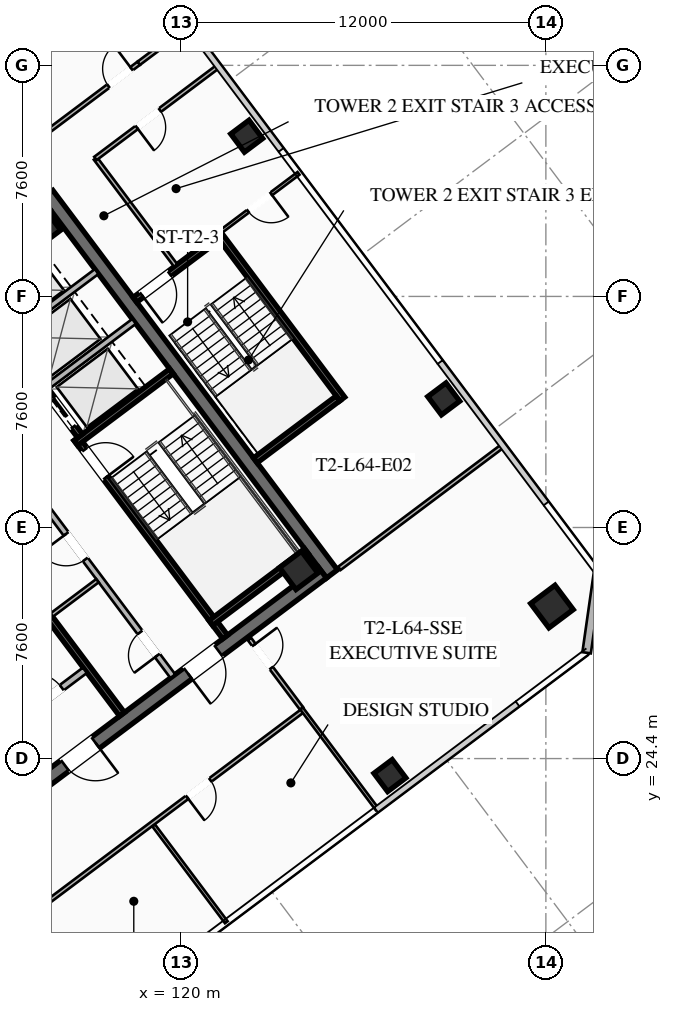
"""IFC4 building model, lengths in metres.
Left out: names, types, materials, properties, quantities, classifications, styles, units other than length and angle.
Written with IfcOpenShell. Run it as: python <this file> out.ifc"""

import sys

from ifc_helpers import new_model, si_unit, direction, frame, frame_2d, origin, origin_2d, place, context, subcontext, project, spatial, rectangle, hollow_rectangle, extrude, element, fill, save


model = new_model("IFC4")
c1 = context("Model", 3, precision=1e-05, world=origin(), true_north=direction((0.0, 1.0)))
c2 = subcontext(c1, "Body", "Model", "MODEL_VIEW")
j1 = project(units=[si_unit("LENGTHUNIT", "METRE"), si_unit("PLANEANGLEUNIT", "RADIAN")], contexts=[c1])
p1 = place(None, origin())
s1 = spatial("IfcSite", under=j1, at=p1, CompositionType="ELEMENT")
p2 = place(p1, origin())
s2 = spatial("IfcBuilding", under=s1, at=p2, CompositionType="ELEMENT")
p3 = place(p2, frame((0.0, 0.0, 236.15)))
s3 = spatial("IfcBuildingStorey", under=s2, at=p3, CompositionType="ELEMENT", Elevation=236.15)
p4 = place(p3, frame((115.604, 42.953, 0.0), z_axis=(0.0, 0.0, 1.0), x_axis=(0.600005007985, -0.799996243986, 0.0)))
e1 = element("IfcWall", 1, at=p4, inside=s3, PredefinedType="SHEAR", context=c2, shape_type="SweptSolid", body=[
    extrude(rectangle(XDim=15.6, YDim=0.45, at=frame_2d((7.8, 0.0))), origin(), (0.0, 0.0, 1.0), 3.55),
])
p5 = place(p3, frame((124.649, 30.518, 0.0), z_axis=(0.0, 0.0, 1.0), x_axis=(-0.8, -0.6, 0.0)))
e2 = element("IfcWall", 2, at=p5, inside=s3, PredefinedType="SHEAR", context=c2, shape_type="SweptSolid", body=[
    extrude(rectangle(XDim=15.26, YDim=0.45, at=frame_2d((7.63, 0.0))), origin(), (0.0, 0.0, 1.0), 3.55),
])
p6 = place(p5, frame((9.33, 0.0, 0.0)))
e3 = element("IfcOpeningElement", 3, at=p6, cuts=e2, PredefinedType="OPENING", context=c2, shape_type="SweptSolid", body=[
    extrude(rectangle(XDim=1.25, YDim=2.25, at=frame_2d((0.625, 1.125))), frame((0.0, 0.235, 0.0), z_axis=(0.0, -1.0, 0.0), x_axis=(1.0, 0.0, 0.0)), (0.0, 0.0, 1.0), 0.47),
])
p7 = place(p5, frame((4.28, 0.0, 0.0)))
e4 = element("IfcOpeningElement", 4, at=p7, cuts=e2, PredefinedType="OPENING", context=c2, shape_type="SweptSolid", body=[
    extrude(rectangle(XDim=1.25, YDim=2.25, at=frame_2d((0.625, 1.125))), frame((0.0, 0.235, 0.0), z_axis=(0.0, -1.0, 0.0), x_axis=(1.0, 0.0, 0.0)), (0.0, 0.0, 1.0), 0.47),
])
for number, where, z_axis, x_axis in (
    (5, (123.87, 30.59, 0.0), (0.0, 0.0, 1.0), (0.8, 0.6, 0.0)),
    (6, (115.41, 41.87, 0.0), (0.0, 0.0, 1.0), (0.8, 0.6, 0.0)),
):
    element("IfcColumn", number, at=place(p3, frame(where, z_axis=z_axis, x_axis=x_axis)), inside=s3, PredefinedType="COLUMN", context=c2, shape_type="SweptSolid", body=[
        extrude(hollow_rectangle(XDim=0.9, YDim=0.9, WallThickness=0.04, at=origin_2d()), origin(), (0.0, 0.0, 1.0), 3.37),
    ])
p8 = place(p3, frame((132.2, 29.4, 0.0), z_axis=(0.0, 0.0, 1.0), x_axis=(0.799999996291, 0.600000004945, 0.0)))
e7 = element("IfcColumn", 7, at=p8, inside=s3, PredefinedType="COLUMN", context=c2, shape_type="SweptSolid", body=[
    extrude(hollow_rectangle(XDim=1.0, YDim=1.0, WallThickness=0.04, at=origin_2d()), origin(), (0.0, 0.0, 1.0), 3.37),
])
for number, where, z_axis, x_axis in (
    (8, (126.87, 23.84, 0.0), (0.0, 0.0, 1.0), (0.8, 0.6, 0.0)),
    (9, (128.64, 36.23, 0.0), (0.0, 0.0, 1.0), (0.8, 0.6, 0.0)),
    (10, (122.16, 44.87, 0.0), (0.0, 0.0, 1.0), (0.8, 0.6, 0.0)),
):
    element("IfcColumn", number, at=place(p3, frame(where, z_axis=z_axis, x_axis=x_axis)), inside=s3, PredefinedType="COLUMN", context=c2, shape_type="SweptSolid", body=[
        extrude(hollow_rectangle(XDim=0.75, YDim=0.75, WallThickness=0.032, at=origin_2d()), origin(), (0.0, 0.0, 1.0), 3.37),
    ])
p9 = place(p3, frame((133.72, 30.54, 0.0), z_axis=(0.0, 0.0, 1.0), x_axis=(-0.141370477216, -0.989956760759, 0.0)))
e11 = element("IfcWall", 11, at=p9, inside=s3, PredefinedType="SOLIDWALL", context=c2, shape_type="SweptSolid", body=[
    extrude(rectangle(XDim=2.687, YDim=0.28, at=frame_2d((1.344, 0.0))), origin(), (0.0, 0.0, 1.0), 3.37),
])
p10 = place(p3, frame((116.56, 34.92, 0.0), z_axis=(0.0, 0.0, 1.0), x_axis=(0.59999041401, -0.800007189403, 0.0)))
e12 = element("IfcWall", 12, at=p10, inside=s3, PredefinedType="SHEAR", context=c2, shape_type="SweptSolid", body=[
    extrude(rectangle(XDim=8.15, YDim=0.2, at=frame_2d((4.075, 0.0))), origin(), (0.0, 0.0, 1.0), 3.37),
])
p11 = place(p10, frame((0.45, 0.0, 0.0)))
e13 = element("IfcOpeningElement", 13, at=p11, cuts=e12, PredefinedType="OPENING", context=c2, shape_type="SweptSolid", body=[
    extrude(rectangle(XDim=1.15, YDim=2.2, at=frame_2d((0.575, 1.1))), frame((0.0, 0.11, 0.0), z_axis=(0.0, -1.0, 0.0), x_axis=(1.0, 0.0, 0.0)), (0.0, 0.0, 1.0), 0.22),
])
for number, where, z_axis, x_axis in (
    (14, (116.54, 34.78, 0.0), (0.0, 0.0, 1.0), (0.8, 0.6, 0.0)),
    (15, (120.98, 28.86, 0.0), (0.0, 0.0, 1.0), (0.8, 0.6, 0.0)),
):
    element("IfcWall", number, at=place(p3, frame(where, z_axis=z_axis, x_axis=x_axis)), inside=s3, PredefinedType="SHEAR", context=c2, shape_type="SweptSolid", body=[
        extrude(rectangle(XDim=3.93, YDim=0.2, at=frame_2d((1.965, 0.0))), origin(), (0.0, 0.0, 1.0), 3.37),
    ])
p12 = place(p3, frame((118.058, 25.856, 0.0), z_axis=(0.0, 0.0, 1.0), x_axis=(-0.600002657301, 0.799998007018, 0.0)))
e16 = element("IfcWall", 16, at=p12, inside=s3, PredefinedType="SHEAR", context=c2, shape_type="SweptSolid", body=[
    extrude(rectangle(XDim=14.7, YDim=0.2, at=frame_2d((7.35, 0.0))), origin(), (0.0, 0.0, 1.0), 3.37),
])
p13 = place(p3, frame((114.316, 25.412, 0.0), z_axis=(0.0, 0.0, 1.0), x_axis=(0.800018601094, 0.59997519774, 0.0)))
e17 = element("IfcWall", 17, at=p13, inside=s3, PredefinedType="SOLIDWALL", context=c2, shape_type="SweptSolid", body=[
    extrude(rectangle(XDim=3.15, YDim=0.22, at=frame_2d((1.575, 0.0))), origin(), (0.0, 0.0, 1.0), 2.723),
])
p14 = place(p13, frame((0.95, 0.0, 0.0)))
e18 = element("IfcOpeningElement", 18, at=p14, cuts=e17, PredefinedType="OPENING", context=c2, shape_type="SweptSolid", body=[
    extrude(rectangle(XDim=1.25, YDim=2.25, at=frame_2d((0.625, 1.125))), frame((0.0, 0.12, 0.0), z_axis=(0.0, -1.0, 0.0), x_axis=(1.0, 0.0, 0.0)), (0.0, 0.0, 1.0), 0.24),
])
p15 = place(p3, frame((112.75, 40.25, 0.0), z_axis=(0.0, 0.0, 1.0), x_axis=(0.599994036198, -0.800004472816, 0.0)))
e19 = element("IfcWall", 19, at=p15, inside=s3, PredefinedType="SHEAR", context=c2, shape_type="SweptSolid", body=[
    extrude(rectangle(XDim=6.55, YDim=0.2, at=frame_2d((3.275, 0.0))), origin(), (0.0, 0.0, 1.0), 3.37),
])
p16 = place(p15, frame((5.075, 0.0, 0.0)))
e20 = element("IfcOpeningElement", 20, at=p16, cuts=e19, PredefinedType="OPENING", context=c2, shape_type="SweptSolid", body=[
    extrude(rectangle(XDim=1.1, YDim=2.2, at=frame_2d((0.55, 1.1))), frame((0.0, 0.11, 0.0), z_axis=(0.0, -1.0, 0.0), x_axis=(1.0, 0.0, 0.0)), (0.0, 0.0, 1.0), 0.22),
])
p17 = place(p15, frame((3.025, 0.0, 0.0)))
e21 = element("IfcOpeningElement", 21, at=p17, cuts=e19, PredefinedType="OPENING", context=c2, shape_type="SweptSolid", body=[
    extrude(rectangle(XDim=1.1, YDim=2.2, at=frame_2d((0.55, 1.1))), frame((0.0, 0.11, 0.0), z_axis=(0.0, -1.0, 0.0), x_axis=(1.0, 0.0, 0.0)), (0.0, 0.0, 1.0), 0.22),
])
p18 = place(p15, frame((1.025, 0.0, 0.0)))
e22 = element("IfcOpeningElement", 22, at=p18, cuts=e19, PredefinedType="OPENING", context=c2, shape_type="SweptSolid", body=[
    extrude(rectangle(XDim=1.1, YDim=2.2, at=frame_2d((0.55, 1.1))), frame((0.0, 0.11, 0.0), z_axis=(0.0, -1.0, 0.0), x_axis=(1.0, 0.0, 0.0)), (0.0, 0.0, 1.0), 0.22),
])
for number, where, z_axis, x_axis in (
    (23, (115.59, 36.63, 0.0), (0.0, 0.0, 1.0), (0.8, 0.6, 0.0)),
    (24, (114.36, 38.27, 0.0), (0.0, 0.0, 1.0), (0.8, 0.6, 0.0)),
):
    element("IfcWall", number, at=place(p3, frame(where, z_axis=z_axis, x_axis=x_axis)), inside=s3, PredefinedType="SOLIDWALL", context=c2, shape_type="SweptSolid", body=[
        extrude(rectangle(XDim=3.58, YDim=0.2, at=frame_2d((1.79, 0.0))), origin(), (0.0, 0.0, 1.0), 3.37),
    ])
p19 = place(p3, frame((119.73, 27.11, 0.0), z_axis=(0.0, 0.0, 1.0), x_axis=(-0.600005580459, 0.799995814625, 0.0)))
e25 = element("IfcWall", 25, at=p19, inside=s3, PredefinedType="SOLIDWALL", context=c2, shape_type="SweptSolid", body=[
    extrude(rectangle(XDim=7.0, YDim=0.2, at=frame_2d((3.5, 0.0))), origin(), (0.0, 0.0, 1.0), 2.723),
])
p20 = place(p19, frame((0.85, 0.0, 0.0)))
e26 = element("IfcOpeningElement", 26, at=p20, cuts=e25, PredefinedType="OPENING", context=c2, shape_type="SweptSolid", body=[
    extrude(rectangle(XDim=0.95, YDim=2.05, at=frame_2d((0.475, 1.025))), frame((0.0, 0.11, 0.0), z_axis=(0.0, -1.0, 0.0), x_axis=(1.0, 0.0, 0.0)), (0.0, 0.0, 1.0), 0.22),
])
p21 = place(p19, frame((4.8, 0.0, 0.0)))
e27 = element("IfcOpeningElement", 27, at=p21, cuts=e25, PredefinedType="OPENING", context=c2, shape_type="SweptSolid", body=[
    extrude(rectangle(XDim=1.05, YDim=2.2, at=frame_2d((0.525, 1.1))), frame((0.0, 0.11, 0.0), z_axis=(0.0, -1.0, 0.0), x_axis=(1.0, 0.0, 0.0)), (0.0, 0.0, 1.0), 0.22),
])
p22 = place(p3, frame((115.746, 29.122, 0.0), z_axis=(0.0, 0.0, 1.0), x_axis=(0.8, 0.6, 0.0)))
e28 = element("IfcWall", 28, at=p22, inside=s3, PredefinedType="PARTITIONING", context=c2, shape_type="SweptSolid", body=[
    extrude(rectangle(XDim=1.88, YDim=0.135, at=frame_2d((0.94, 0.0))), origin(), (0.0, 0.0, 1.0), 2.723),
])
p23 = place(p3, frame((125.304, 36.228, 0.0), z_axis=(0.0, 0.0, 1.0), x_axis=(-0.59998851072, 0.800008616831, 0.0)))
e29 = element("IfcWall", 29, at=p23, inside=s3, PredefinedType="SHEAR", context=c2, shape_type="SweptSolid", body=[
    extrude(rectangle(XDim=6.8, YDim=0.2, at=frame_2d((3.4, 0.0))), origin(), (0.0, 0.0, 1.0), 3.37),
])
p24 = place(p3, frame((121.204, 41.528, 0.0), z_axis=(0.0, 0.0, 1.0), x_axis=(-0.800017232136, -0.599977023131, 0.0)))
e30 = element("IfcWall", 30, at=p24, inside=s3, PredefinedType="SHEAR", context=c2, shape_type="SweptSolid", body=[
    extrude(rectangle(XDim=3.4, YDim=0.2, at=frame_2d((1.7, 0.0))), origin(), (0.0, 0.0, 1.0), 3.37),
])
p25 = place(p24, frame((1.975, 0.0, 0.0)))
e31 = element("IfcOpeningElement", 31, at=p25, cuts=e30, PredefinedType="OPENING", context=c2, shape_type="SweptSolid", body=[
    extrude(rectangle(XDim=1.15, YDim=2.2, at=frame_2d((0.575, 1.1))), frame((0.0, 0.11, 0.0), z_axis=(0.0, -1.0, 0.0), x_axis=(1.0, 0.0, 0.0)), (0.0, 0.0, 1.0), 0.22),
])
p26 = place(p3, frame((122.444, 34.208, 0.0), z_axis=(0.0, 0.0, 1.0), x_axis=(0.79999138319, 0.600011488909, 0.0)))
e32 = element("IfcWall", 32, at=p26, inside=s3, PredefinedType="SHEAR", context=c2, shape_type="SweptSolid", body=[
    extrude(rectangle(XDim=3.4, YDim=0.2, at=frame_2d((1.7, 0.0))), origin(), (0.0, 0.0, 1.0), 3.37),
])
p27 = place(p3, frame((119.824, 40.618, 0.0), z_axis=(0.0, 0.0, 1.0), x_axis=(-0.599982243973, 0.800013316712, 0.0)))
e33 = element("IfcWall", 33, at=p27, inside=s3, PredefinedType="PARTITIONING", context=c2, shape_type="SweptSolid", body=[
    extrude(rectangle(XDim=4.4, YDim=0.135, at=frame_2d((2.2, 0.0))), origin(), (0.0, 0.0, 1.0), 2.723),
])
p28 = place(p3, frame((99.746, 33.122, 0.0), z_axis=(0.0, 0.0, 1.0), x_axis=(0.800001242445, 0.599998343403, 0.0)))
e34 = element("IfcWall", 34, at=p28, inside=s3, PredefinedType="PARTITIONING", context=c2, shape_type="SweptSolid", body=[
    extrude(rectangle(XDim=23.58, YDim=0.135, at=frame_2d((11.79, 0.0))), origin(), (0.0, 0.0, 1.0), 2.723),
])
p29 = place(p28, frame((0.3, 0.0, 0.0)))
e35 = element("IfcOpeningElement", 35, at=p29, cuts=e34, PredefinedType="OPENING", context=c2, shape_type="SweptSolid", body=[
    extrude(rectangle(XDim=0.95, YDim=2.05, at=frame_2d((0.475, 1.025))), frame((0.0, 0.077, 0.0), z_axis=(0.0, -1.0, 0.0), x_axis=(1.0, 0.0, 0.0)), (0.0, 0.0, 1.0), 0.155),
])
p30 = place(p28, frame((10.512, 0.0, 0.0)))
e36 = element("IfcOpeningElement", 36, at=p30, cuts=e34, PredefinedType="OPENING", context=c2, shape_type="SweptSolid", body=[
    extrude(rectangle(XDim=0.95, YDim=2.05, at=frame_2d((0.475, 1.025))), frame((0.0, 0.077, 0.0), z_axis=(0.0, -1.0, 0.0), x_axis=(1.0, 0.0, 0.0)), (0.0, 0.0, 1.0), 0.155),
])
p31 = place(p28, frame((22.33, 0.0, 0.0)))
e37 = element("IfcOpeningElement", 37, at=p31, cuts=e34, PredefinedType="OPENING", context=c2, shape_type="SweptSolid", body=[
    extrude(rectangle(XDim=0.95, YDim=2.05, at=frame_2d((0.475, 1.025))), frame((0.0, 0.077, 0.0), z_axis=(0.0, -1.0, 0.0), x_axis=(1.0, 0.0, 0.0)), (0.0, 0.0, 1.0), 0.155),
])
p32 = place(p3, frame((118.61, 47.27, 0.0), z_axis=(0.0, 0.0, 1.0), x_axis=(0.799956698502, 0.600057730991, 0.0)))
e38 = element("IfcWall", 38, at=p32, inside=s3, PredefinedType="PARTITIONING", context=c2, shape_type="SweptSolid", body=[
    extrude(rectangle(XDim=2.03, YDim=0.135, at=frame_2d((1.015, 0.0))), origin(), (0.0, 0.0, 1.0), 2.723),
])
p33 = place(p3, frame((124.012, 25.984, 0.0), z_axis=(0.0, 0.0, 1.0), x_axis=(-0.800003872688, -0.599994836382, 0.0)))
e39 = element("IfcWall", 39, at=p33, inside=s3, PredefinedType="PARTITIONING", context=c2, shape_type="SweptSolid", body=[
    extrude(rectangle(XDim=15.13, YDim=0.135, at=frame_2d((7.565, 0.0))), origin(), (0.0, 0.0, 1.0), 2.723),
])
p34 = place(p33, frame((13.8, 0.0, 0.0)))
e40 = element("IfcOpeningElement", 40, at=p34, cuts=e39, PredefinedType="OPENING", context=c2, shape_type="SweptSolid", body=[
    extrude(rectangle(XDim=0.95, YDim=2.05, at=frame_2d((0.475, 1.025))), frame((0.0, 0.077, 0.0), z_axis=(0.0, -1.0, 0.0), x_axis=(1.0, 0.0, 0.0)), (0.0, 0.0, 1.0), 0.155),
])
p35 = place(p33, frame((3.813, 0.0, 0.0)))
e41 = element("IfcOpeningElement", 41, at=p35, cuts=e39, PredefinedType="OPENING", context=c2, shape_type="SweptSolid", body=[
    extrude(rectangle(XDim=0.95, YDim=2.05, at=frame_2d((0.475, 1.025))), frame((0.0, 0.077, 0.0), z_axis=(0.0, -1.0, 0.0), x_axis=(1.0, 0.0, 0.0)), (0.0, 0.0, 1.0), 0.155),
])
p36 = place(p3, frame((122.248, 28.336, 0.0), z_axis=(0.0, 0.0, 1.0), x_axis=(0.600040975122, -0.799969267018, 0.0)))
e42 = element("IfcWall", 42, at=p36, inside=s3, PredefinedType="PARTITIONING", context=c2, shape_type="SweptSolid", body=[
    extrude(rectangle(XDim=2.86, YDim=0.135, at=frame_2d((1.43, 0.0))), origin(), (0.0, 0.0, 1.0), 2.723),
])
p37 = place(p36, frame((0.25, 0.0, 0.0)))
e43 = element("IfcOpeningElement", 43, at=p37, cuts=e42, PredefinedType="OPENING", context=c2, shape_type="SweptSolid", body=[
    extrude(rectangle(XDim=0.95, YDim=2.05, at=frame_2d((0.475, 1.025))), frame((0.0, 0.077, 0.0), z_axis=(0.0, -1.0, 0.0), x_axis=(1.0, 0.0, 0.0)), (0.0, 0.0, 1.0), 0.155),
])
p38 = place(p3, frame((121.488, 19.016, 0.0), z_axis=(0.0, 0.0, 1.0), x_axis=(-0.600009815063, 0.799992638609, 0.0)))
e44 = element("IfcWall", 44, at=p38, inside=s3, PredefinedType="PARTITIONING", context=c2, shape_type="SweptSolid", body=[
    extrude(rectangle(XDim=3.98, YDim=0.11, at=frame_2d((1.99, 0.0))), origin(), (0.0, 0.0, 1.0), 2.723),
])
p39 = place(p3, frame((126.448, 22.736, 0.0), z_axis=(0.0, 0.0, 1.0), x_axis=(-0.599981128793, 0.800014153057, 0.0)))
e45 = element("IfcWall", 45, at=p39, inside=s3, PredefinedType="PARTITIONING", context=c2, shape_type="SweptSolid", body=[
    extrude(rectangle(XDim=4.14, YDim=0.11, at=frame_2d((2.07, 0.0))), origin(), (0.0, 0.0, 1.0), 2.723),
])
p40 = place(p3, frame((121.224, 47.168, 0.0), z_axis=(0.0, 0.0, 1.0), x_axis=(-0.8, -0.6, 0.0)))
e46 = element("IfcWall", 46, at=p40, inside=s3, PredefinedType="PARTITIONING", context=c2, shape_type="SweptSolid", body=[
    extrude(rectangle(XDim=5.05, YDim=0.135, at=frame_2d((2.525, 0.0))), origin(), (0.0, 0.0, 1.0), 2.723),
])
p41 = place(p40, frame((2.4, 0.0, 0.0)))
e47 = element("IfcOpeningElement", 47, at=p41, cuts=e46, PredefinedType="OPENING", context=c2, shape_type="SweptSolid", body=[
    extrude(rectangle(XDim=0.95, YDim=2.05, at=frame_2d((0.475, 1.025))), frame((0.0, 0.077, 0.0), z_axis=(0.0, -1.0, 0.0), x_axis=(1.0, 0.0, 0.0)), (0.0, 0.0, 1.0), 0.155),
])
p42 = place(p3, frame((125.208, 30.656, 0.0), z_axis=(0.0, 0.0, 1.0), x_axis=(0.8, 0.6, 0.0)))
e48 = element("IfcWall", 48, at=p42, inside=s3, PredefinedType="PARTITIONING", context=c2, shape_type="SweptSolid", body=[
    extrude(rectangle(XDim=6.72, YDim=0.135, at=frame_2d((3.36, 0.0))), origin(), (0.0, 0.0, 1.0), 2.723),
])
p43 = place(p3, frame((123.864, 43.648, 0.0), z_axis=(0.0, 0.0, 1.0), x_axis=(-0.800018310174, -0.599975585658, 0.0)))
e49 = element("IfcWall", 49, at=p43, inside=s3, PredefinedType="PARTITIONING", context=c2, shape_type="SweptSolid", body=[
    extrude(rectangle(XDim=3.2, YDim=0.11, at=frame_2d((1.6, 0.0))), origin(), (0.0, 0.0, 1.0), 2.723),
])
p44 = place(p43, frame((1.125, 0.0, 0.0)))
e50 = element("IfcOpeningElement", 50, at=p44, cuts=e49, PredefinedType="OPENING", context=c2, shape_type="SweptSolid", body=[
    extrude(rectangle(XDim=0.95, YDim=2.05, at=frame_2d((0.475, 1.025))), frame((0.0, 0.065, 0.0), z_axis=(0.0, -1.0, 0.0), x_axis=(1.0, 0.0, 0.0)), (0.0, 0.0, 1.0), 0.13),
])
p45 = place(p6, origin())
e51 = element("IfcDoor", 51, at=p45, inside=s3, OperationType="SINGLE_SWING_LEFT", PredefinedType="DOOR", context=c2, shape_type="SweptSolid", body=[
    extrude(rectangle(XDim=1.25, YDim=2.25, at=frame_2d((0.625, 1.125))), frame((0.0, 0.025, 0.0), z_axis=(0.0, -1.0, 0.0), x_axis=(1.0, 0.0, 0.0)), (0.0, 0.0, 1.0), 0.05),
])
fill(e3, e51)
p46 = place(p7, origin())
e52 = element("IfcDoor", 52, at=p46, inside=s3, OperationType="SINGLE_SWING_RIGHT", PredefinedType="DOOR", context=c2, shape_type="SweptSolid", body=[
    extrude(rectangle(XDim=1.25, YDim=2.25, at=frame_2d((0.625, 1.125))), frame((0.0, 0.025, 0.0), z_axis=(0.0, -1.0, 0.0), x_axis=(1.0, 0.0, 0.0)), (0.0, 0.0, 1.0), 0.05),
])
fill(e4, e52)
p47 = place(p11, origin())
e53 = element("IfcDoor", 53, at=p47, inside=s3, OperationType="SINGLE_SWING_RIGHT", PredefinedType="DOOR", context=c2, shape_type="SweptSolid", body=[
    extrude(rectangle(XDim=1.15, YDim=2.2, at=frame_2d((0.575, 1.1))), frame((0.0, 0.025, 0.0), z_axis=(0.0, -1.0, 0.0), x_axis=(1.0, 0.0, 0.0)), (0.0, 0.0, 1.0), 0.05),
])
fill(e13, e53)
p48 = place(p14, origin())
e54 = element("IfcDoor", 54, at=p48, inside=s3, OperationType="SINGLE_SWING_LEFT", PredefinedType="DOOR", context=c2, shape_type="SweptSolid", body=[
    extrude(rectangle(XDim=1.25, YDim=2.25, at=frame_2d((0.625, 1.125))), frame((0.0, 0.025, 0.0), z_axis=(0.0, -1.0, 0.0), x_axis=(1.0, 0.0, 0.0)), (0.0, 0.0, 1.0), 0.05),
])
fill(e18, e54)
p49 = place(p20, origin())
e55 = element("IfcDoor", 55, at=p49, inside=s3, OperationType="SINGLE_SWING_LEFT", PredefinedType="DOOR", context=c2, shape_type="SweptSolid", body=[
    extrude(rectangle(XDim=0.95, YDim=2.05, at=frame_2d((0.475, 1.025))), frame((0.0, 0.025, 0.0), z_axis=(0.0, -1.0, 0.0), x_axis=(1.0, 0.0, 0.0)), (0.0, 0.0, 1.0), 0.05),
])
fill(e26, e55)
p50 = place(p21, origin())
e56 = element("IfcDoor", 56, at=p50, inside=s3, OperationType="SINGLE_SWING_RIGHT", PredefinedType="DOOR", context=c2, shape_type="SweptSolid", body=[
    extrude(rectangle(XDim=1.05, YDim=2.2, at=frame_2d((0.525, 1.1))), frame((0.0, 0.025, 0.0), z_axis=(0.0, -1.0, 0.0), x_axis=(1.0, 0.0, 0.0)), (0.0, 0.0, 1.0), 0.05),
])
fill(e27, e56)
p51 = place(p25, origin())
e57 = element("IfcDoor", 57, at=p51, inside=s3, OperationType="SINGLE_SWING_RIGHT", PredefinedType="DOOR", context=c2, shape_type="SweptSolid", body=[
    extrude(rectangle(XDim=1.15, YDim=2.2, at=frame_2d((0.575, 1.1))), frame((0.0, 0.025, 0.0), z_axis=(0.0, -1.0, 0.0), x_axis=(1.0, 0.0, 0.0)), (0.0, 0.0, 1.0), 0.05),
])
fill(e31, e57)
p52 = place(p31, origin())
e58 = element("IfcDoor", 58, at=p52, inside=s3, OperationType="SINGLE_SWING_RIGHT", PredefinedType="DOOR", context=c2, shape_type="SweptSolid", body=[
    extrude(rectangle(XDim=0.95, YDim=2.05, at=frame_2d((0.475, 1.025))), frame((0.0, 0.025, 0.0), z_axis=(0.0, -1.0, 0.0), x_axis=(1.0, 0.0, 0.0)), (0.0, 0.0, 1.0), 0.05),
])
fill(e37, e58)
p53 = place(p35, origin())
e59 = element("IfcDoor", 59, at=p53, inside=s3, OperationType="SINGLE_SWING_RIGHT", PredefinedType="DOOR", context=c2, shape_type="SweptSolid", body=[
    extrude(rectangle(XDim=0.95, YDim=2.05, at=frame_2d((0.475, 1.025))), frame((0.0, 0.025, 0.0), z_axis=(0.0, -1.0, 0.0), x_axis=(1.0, 0.0, 0.0)), (0.0, 0.0, 1.0), 0.05),
])
fill(e41, e59)
p54 = place(p37, origin())
e60 = element("IfcDoor", 60, at=p54, inside=s3, OperationType="SINGLE_SWING_LEFT", PredefinedType="DOOR", context=c2, shape_type="SweptSolid", body=[
    extrude(rectangle(XDim=0.95, YDim=2.05, at=frame_2d((0.475, 1.025))), frame((0.0, 0.025, 0.0), z_axis=(0.0, -1.0, 0.0), x_axis=(1.0, 0.0, 0.0)), (0.0, 0.0, 1.0), 0.05),
])
fill(e43, e60)
p55 = place(p41, origin())
e61 = element("IfcDoor", 61, at=p55, inside=s3, OperationType="SINGLE_SWING_RIGHT", PredefinedType="DOOR", context=c2, shape_type="SweptSolid", body=[
    extrude(rectangle(XDim=0.95, YDim=2.05, at=frame_2d((0.475, 1.025))), frame((0.0, 0.025, 0.0), z_axis=(0.0, -1.0, 0.0), x_axis=(1.0, 0.0, 0.0)), (0.0, 0.0, 1.0), 0.05),
])
fill(e47, e61)
p56 = place(p44, origin())
e62 = element("IfcDoor", 62, at=p56, inside=s3, OperationType="SINGLE_SWING_LEFT", PredefinedType="DOOR", context=c2, shape_type="SweptSolid", body=[
    extrude(rectangle(XDim=0.95, YDim=2.05, at=frame_2d((0.475, 1.025))), frame((0.0, 0.025, 0.0), z_axis=(0.0, -1.0, 0.0), x_axis=(1.0, 0.0, 0.0)), (0.0, 0.0, 1.0), 0.05),
])
fill(e50, e62)
p57 = place(p16, origin())
e63 = element("IfcDoor", 63, at=p57, inside=s3, OperationType="SLIDING_TO_LEFT", PredefinedType="DOOR", context=c2, shape_type="SweptSolid", body=[
    extrude(rectangle(XDim=1.1, YDim=2.2, at=frame_2d((0.55, 1.1))), frame((0.0, 0.025, 0.0), z_axis=(0.0, -1.0, 0.0), x_axis=(1.0, 0.0, 0.0)), (0.0, 0.0, 1.0), 0.05),
])
fill(e20, e63)
save(model, sys.argv[1])
